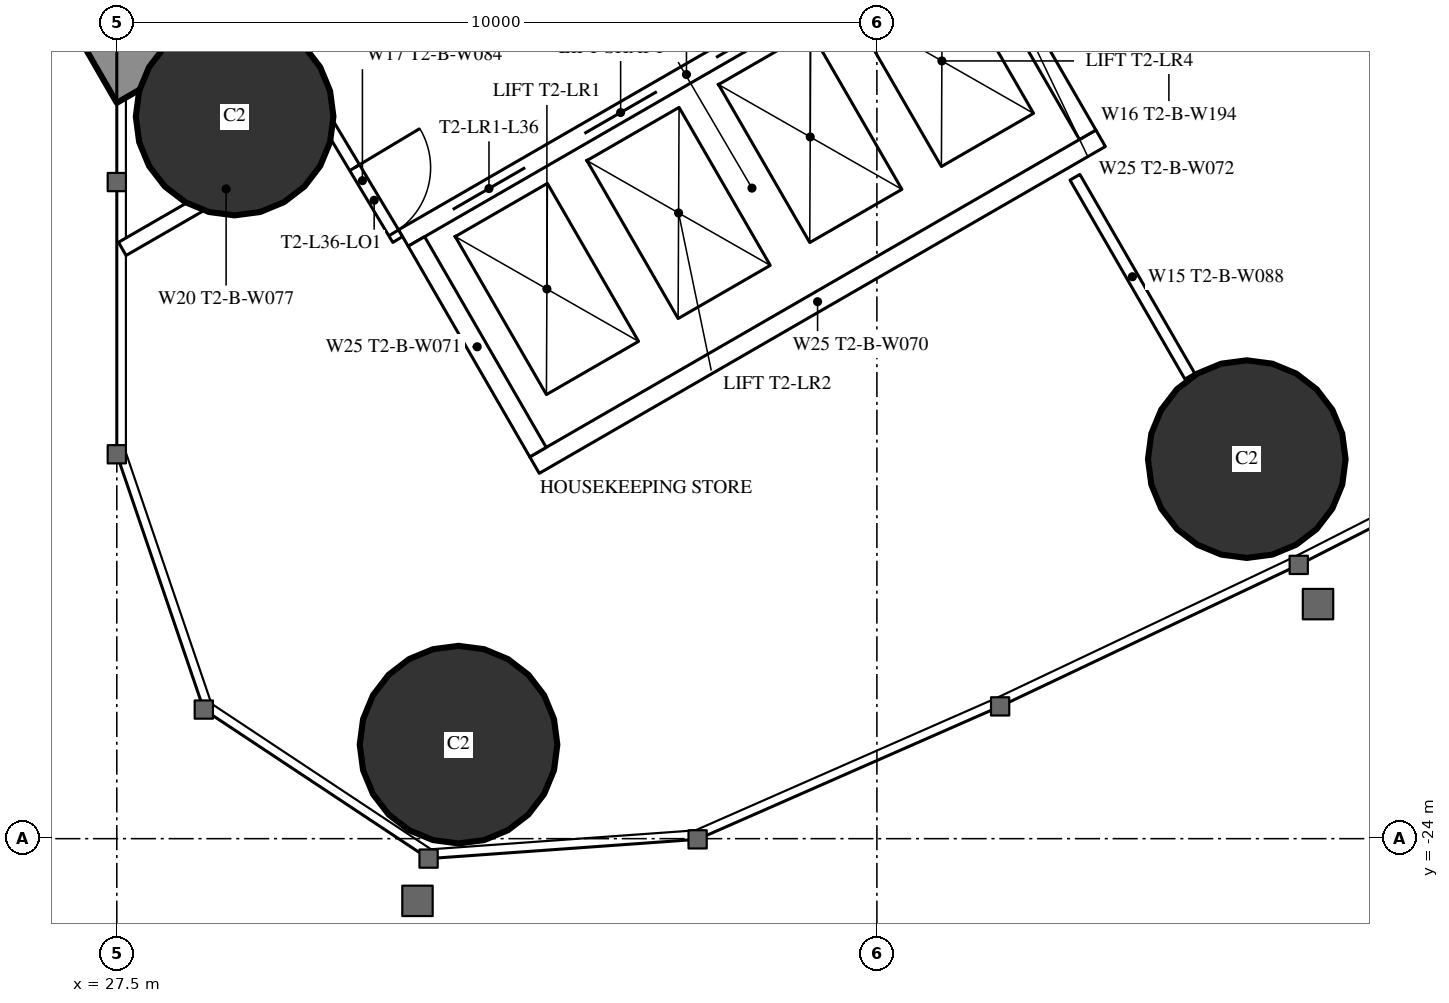
"""IFC4 building model, lengths in metres.
Left out: names, types, materials, properties, quantities, classifications, styles, units other than length and angle.
Written with IfcOpenShell. Run it as: python <this file> out.ifc"""

import sys

from ifc_helpers import new_model, si_unit, direction, frame, frame_2d, origin, origin_2d, place, context, subcontext, project, spatial, rectangle, hollow_circle, extrude, element, fill, save


model = new_model("IFC4")
c1 = context("Model", 3, precision=1e-05, world=origin(), true_north=direction((0.0, 1.0)))
c2 = subcontext(c1, "Body", "Model", "MODEL_VIEW")
j1 = project(units=[si_unit("LENGTHUNIT", "METRE"), si_unit("PLANEANGLEUNIT", "RADIAN")], contexts=[c1])
p1 = place(None, origin())
s1 = spatial("IfcSite", under=j1, at=p1, CompositionType="ELEMENT")
p2 = place(p1, origin())
s2 = spatial("IfcBuilding", under=s1, at=p2, CompositionType="ELEMENT")
p3 = place(p2, frame((0.0, 0.0, 136.1)))
s3 = spatial("IfcBuildingStorey", under=s2, at=p3, CompositionType="ELEMENT", Elevation=136.1)
for number, where, z_axis, x_axis in (
    (1, (31.996, -22.763, 0.0), (0.0, 0.0, 1.0), (1.0, 0.0, 0.0)),
    (2, (29.05, -14.5, 0.0), (0.0, 0.0, 1.0), (1.0, 0.0, 0.0)),
    (3, (42.366, -19.007, 0.0), (0.0, 0.0, 1.0), (1.0, 0.0, 0.0)),
):
    element("IfcColumn", number, at=place(p3, frame(where, z_axis=z_axis, x_axis=x_axis)), inside=s3, PredefinedType="COLUMN", context=c2, shape_type="SweptSolid", body=[
        extrude(hollow_circle(Radius=1.3, WallThickness=0.1, at=origin_2d()), origin(), (0.0, 0.0, 1.0), 3.5),
    ])
p4 = place(p3, frame((27.2, -13.8, 0.0), z_axis=(0.0, 0.0, 1.0), x_axis=(0.866027159892, 0.499996958321, 0.0)))
e4 = element("IfcWall", 4, at=p4, inside=s3, PredefinedType="SHEAR", context=c2, shape_type="SweptSolid", body=[
    extrude(rectangle(XDim=27.947, YDim=1.2, at=frame_2d((13.973, 0.0))), origin(), (0.0, 0.0, 1.0), 3.5),
])
p5 = place(p4, frame((4.6, 0.0, 0.0)))
e5 = element("IfcOpeningElement", 5, at=p5, cuts=e4, PredefinedType="OPENING", context=c2, shape_type="SweptSolid", body=[
    extrude(rectangle(XDim=1.0, YDim=2.2, at=frame_2d((0.5, 1.1))), frame((0.0, 0.61, 0.0), z_axis=(0.0, -1.0, 0.0), x_axis=(1.0, 0.0, 0.0)), (0.0, 0.0, 1.0), 1.22),
])
p6 = place(p4, frame((13.395, 0.0, 0.0)))
e6 = element("IfcOpeningElement", 6, at=p6, cuts=e4, PredefinedType="OPENING", context=c2, shape_type="SweptSolid", body=[
    extrude(rectangle(XDim=1.8, YDim=2.2, at=frame_2d((0.9, 1.1))), frame((0.0, 0.61, 0.0), z_axis=(0.0, -1.0, 0.0), x_axis=(1.0, 0.0, 0.0)), (0.0, 0.0, 1.0), 1.22),
])
p7 = place(p3, frame((40.105, -15.299, 0.0), z_axis=(0.0, 0.0, 1.0), x_axis=(0.499978822259, -0.866037630414, 0.0)))
e7 = element("IfcWall", 7, at=p7, inside=s3, PredefinedType="PARTITIONING", context=c2, shape_type="SweptSolid", body=[
    extrude(rectangle(XDim=3.023, YDim=0.15, at=frame_2d((1.511, 0.0))), origin(), (0.0, 0.0, 1.0), 3.25),
])
p8 = place(p3, frame((27.572, -16.241, 0.0), z_axis=(0.0, 0.0, 1.0), x_axis=(0.866029654818, 0.499992636921, 0.0)))
e8 = element("IfcWall", 8, at=p8, inside=s3, PredefinedType="PARTITIONING", context=c2, shape_type="SweptSolid", body=[
    extrude(rectangle(XDim=3.155, YDim=0.2, at=frame_2d((1.577, 0.0))), origin(), (0.0, 0.0, 1.0), 3.25),
])
p9 = place(p3, frame((30.267, -14.569, 0.0), z_axis=(0.0, 0.0, 1.0), x_axis=(0.514336634837, -0.857588377991, 0.0)))
e9 = element("IfcWall", 9, at=p9, inside=s3, PredefinedType="PARTITIONING", context=c2, shape_type="SweptSolid", body=[
    extrude(rectangle(XDim=1.805, YDim=0.15, at=frame_2d((0.903, 0.0))), origin(), (0.0, 0.0, 1.0), 3.25),
])
p10 = place(p9, frame((0.703, 0.0, 0.0)))
e10 = element("IfcOpeningElement", 10, at=p10, cuts=e9, PredefinedType="OPENING", context=c2, shape_type="SweptSolid", body=[
    extrude(rectangle(XDim=1.0, YDim=2.2, at=frame_2d((0.5, 1.1))), frame((0.0, 0.085, 0.0), z_axis=(0.0, -1.0, 0.0), x_axis=(1.0, 0.0, 0.0)), (0.0, 0.0, 1.0), 0.17),
])
p11 = place(p3, frame((40.27, -13.644, 0.0), z_axis=(0.0, 0.0, 1.0), x_axis=(0.866031185235, 0.4999899861, 0.0)))
e11 = element("IfcWall", 11, at=p11, inside=s3, PredefinedType="PARTITIONING", context=c2, shape_type="SweptSolid", body=[
    extrude(rectangle(XDim=2.475, YDim=0.15, at=frame_2d((1.238, 0.0))), origin(), (0.0, 0.0, 1.0), 3.25),
])
p12 = place(p3, frame((31.271, -16.097, 0.0), z_axis=(0.0, 0.0, 1.0), x_axis=(0.86604045752, 0.499973925258, 0.0)))
e12 = element("IfcWall", 12, at=p12, inside=s3, PredefinedType="PARTITIONING", context=c2, shape_type="SweptSolid", body=[
    extrude(rectangle(XDim=8.6, YDim=0.25, at=frame_2d((4.3, 0.0))), origin(), (0.0, 0.0, 1.0), 3.25),
])
p13 = place(p12, frame((0.75, 0.0, 0.0)))
e13 = element("IfcOpeningElement", 13, at=p13, cuts=e12, PredefinedType="OPENING", context=c2, shape_type="SweptSolid", body=[
    extrude(rectangle(XDim=1.1, YDim=2.2, at=frame_2d((0.55, 1.1))), frame((0.0, 0.135, 0.0), z_axis=(0.0, -1.0, 0.0), x_axis=(1.0, 0.0, 0.0)), (0.0, 0.0, 1.0), 0.27),
])
p14 = place(p12, frame((2.75, 0.0, 0.0)))
e14 = element("IfcOpeningElement", 14, at=p14, cuts=e12, PredefinedType="OPENING", context=c2, shape_type="SweptSolid", body=[
    extrude(rectangle(XDim=1.1, YDim=2.2, at=frame_2d((0.55, 1.1))), frame((0.0, 0.135, 0.0), z_axis=(0.0, -1.0, 0.0), x_axis=(1.0, 0.0, 0.0)), (0.0, 0.0, 1.0), 0.27),
])
p15 = place(p12, frame((4.75, 0.0, 0.0)))
e15 = element("IfcOpeningElement", 15, at=p15, cuts=e12, PredefinedType="OPENING", context=c2, shape_type="SweptSolid", body=[
    extrude(rectangle(XDim=1.1, YDim=2.2, at=frame_2d((0.55, 1.1))), frame((0.0, 0.135, 0.0), z_axis=(0.0, -1.0, 0.0), x_axis=(1.0, 0.0, 0.0)), (0.0, 0.0, 1.0), 0.27),
])
p16 = place(p12, frame((6.75, 0.0, 0.0)))
e16 = element("IfcOpeningElement", 16, at=p16, cuts=e12, PredefinedType="OPENING", context=c2, shape_type="SweptSolid", body=[
    extrude(rectangle(XDim=1.1, YDim=2.2, at=frame_2d((0.55, 1.1))), frame((0.0, 0.135, 0.0), z_axis=(0.0, -1.0, 0.0), x_axis=(1.0, 0.0, 0.0)), (0.0, 0.0, 1.0), 0.27),
])
p17 = place(p3, frame((32.996, -19.086, 0.0), z_axis=(0.0, 0.0, 1.0), x_axis=(0.866028165386, 0.499995216735, 0.0)))
e17 = element("IfcWall", 17, at=p17, inside=s3, PredefinedType="PARTITIONING", context=c2, shape_type="SweptSolid", body=[
    extrude(rectangle(XDim=8.6, YDim=0.25, at=frame_2d((4.3, 0.0))), origin(), (0.0, 0.0, 1.0), 3.25),
])
for number, where, z_axis, x_axis in (
    (18, (31.441, -16.143, 0.0), (0.0, 0.0, 1.0), (0.5, -0.866, 0.0)),
    (19, (38.673, -11.968, 0.0), (0.0, 0.0, 1.0), (0.5, -0.866, 0.0)),
):
    element("IfcWall", number, at=place(p3, frame(where, z_axis=z_axis, x_axis=x_axis)), inside=s3, PredefinedType="PARTITIONING", context=c2, shape_type="SweptSolid", body=[
        extrude(rectangle(XDim=3.201, YDim=0.25, at=frame_2d((1.6, 0.0))), origin(), (0.0, 0.0, 1.0), 3.25),
    ])
p18 = place(p10, origin())
e20 = element("IfcDoor", 20, at=p18, inside=s3, OperationType="SINGLE_SWING_LEFT", PredefinedType="DOOR", context=c2, shape_type="SweptSolid", body=[
    extrude(rectangle(XDim=1.0, YDim=2.2, at=frame_2d((0.5, 1.1))), frame((0.0, 0.025, 0.0), z_axis=(0.0, -1.0, 0.0), x_axis=(1.0, 0.0, 0.0)), (0.0, 0.0, 1.0), 0.05),
])
fill(e10, e20)
p19 = place(p13, origin())
e21 = element("IfcDoor", 21, at=p19, inside=s3, OperationType="DOUBLE_DOOR_SLIDING", PredefinedType="USERDEFINED", context=c2, shape_type="SweptSolid", body=[
    extrude(rectangle(XDim=1.1, YDim=2.2, at=frame_2d((0.55, 1.1))), frame((0.0, 0.025, 0.0), z_axis=(0.0, -1.0, 0.0), x_axis=(1.0, 0.0, 0.0)), (0.0, 0.0, 1.0), 0.05),
])
fill(e13, e21)
p20 = place(p14, origin())
e22 = element("IfcDoor", 22, at=p20, inside=s3, OperationType="DOUBLE_DOOR_SLIDING", PredefinedType="USERDEFINED", context=c2, shape_type="SweptSolid", body=[
    extrude(rectangle(XDim=1.1, YDim=2.2, at=frame_2d((0.55, 1.1))), frame((0.0, 0.025, 0.0), z_axis=(0.0, -1.0, 0.0), x_axis=(1.0, 0.0, 0.0)), (0.0, 0.0, 1.0), 0.05),
])
fill(e14, e22)
p21 = place(p15, origin())
e23 = element("IfcDoor", 23, at=p21, inside=s3, OperationType="DOUBLE_DOOR_SLIDING", PredefinedType="USERDEFINED", context=c2, shape_type="SweptSolid", body=[
    extrude(rectangle(XDim=1.1, YDim=2.2, at=frame_2d((0.55, 1.1))), frame((0.0, 0.025, 0.0), z_axis=(0.0, -1.0, 0.0), x_axis=(1.0, 0.0, 0.0)), (0.0, 0.0, 1.0), 0.05),
])
fill(e15, e23)
save(model, sys.argv[1])
